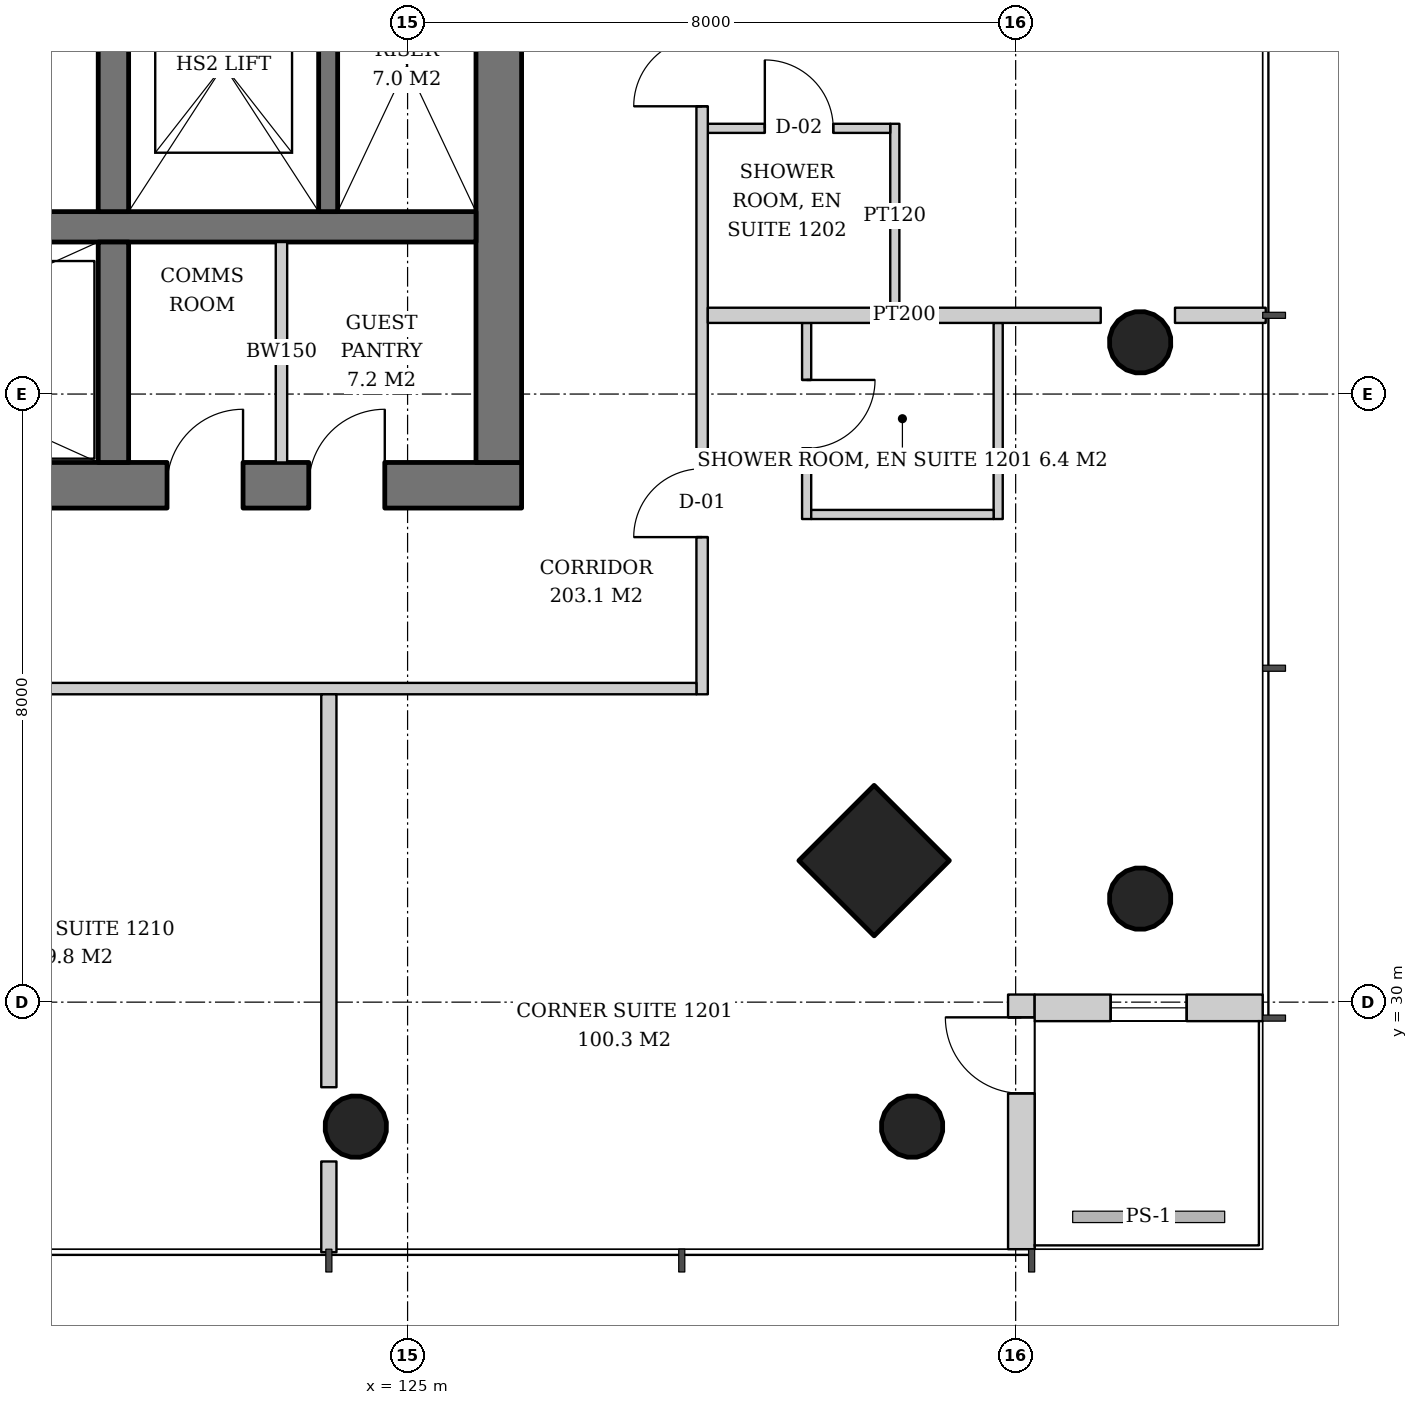
"""IFC4 building model, lengths in metres.
Left out: names, types, materials, properties, quantities, classifications, styles, units other than length and angle.
Written with IfcOpenShell. Run it as: python <this file> out.ifc"""

import sys

from ifc_helpers import new_model, si_unit, direction, frame, frame_2d, origin, origin_2d, place, context, subcontext, project, spatial, rectangle, hollow_circle, extrude, element, fill, save


model = new_model("IFC4")
c1 = context("Model", 3, precision=1e-05, world=origin(), true_north=direction((0.0, 1.0)))
c2 = subcontext(c1, "Body", "Model", "MODEL_VIEW")
j1 = project(units=[si_unit("LENGTHUNIT", "METRE"), si_unit("PLANEANGLEUNIT", "RADIAN")], contexts=[c1])
p1 = place(None, origin())
s1 = spatial("IfcSite", under=j1, at=p1, CompositionType="ELEMENT")
p2 = place(p1, origin())
s2 = spatial("IfcBuilding", under=s1, at=p2, CompositionType="ELEMENT")
p3 = place(p2, frame((0.0, 0.0, 51.4)))
s3 = spatial("IfcBuildingStorey", under=s2, at=p3, CompositionType="ELEMENT", Elevation=51.4)
p4 = place(p3, frame((134.69, 31.31, 0.0), z_axis=(-0.043029647111, 0.043029647111, 0.998146732169), x_axis=(-0.707106781187, -0.707106781187, 0.0)))
e1 = element("IfcColumn", 1, at=p4, inside=s3, PredefinedType="COLUMN", context=c2, shape_type="SweptSolid", body=[
    extrude(hollow_circle(Radius=0.406, WallThickness=0.03, at=origin_2d()), origin(), (0.0, 0.0, 1.0), 3.807),
])
p5 = place(p3, frame((134.69, 38.655, 0.0), z_axis=(-0.043059584825, 0.021497706284, 0.998841188968), x_axis=(-0.446680166538, -0.894693706707, 0.0)))
e2 = element("IfcColumn", 2, at=p5, inside=s3, PredefinedType="COLUMN", context=c2, shape_type="SweptSolid", body=[
    extrude(hollow_circle(Radius=0.406, WallThickness=0.03, at=origin_2d()), origin(), (0.0, 0.0, 1.0), 3.804),
])
p6 = place(p3, frame((131.19, 31.81, 0.0), z_axis=(-0.043029647111, 0.043029647111, 0.998146732169), x_axis=(-0.707106781187, -0.707106781187, 0.0)))
e3 = element("IfcColumn", 3, at=p6, inside=s3, PredefinedType="COLUMN", context=c2, shape_type="SweptSolid", body=[
    extrude(rectangle(XDim=1.4, YDim=1.4, at=origin_2d()), origin(), (0.0, 0.0, 1.0), 3.807),
])
p7 = place(p3, frame((131.69, 28.31, 0.0), z_axis=(-0.043029647111, 0.043029647111, 0.998146732169), x_axis=(-0.707106781187, -0.707106781187, 0.0)))
e4 = element("IfcColumn", 4, at=p7, inside=s3, PredefinedType="COLUMN", context=c2, shape_type="SweptSolid", body=[
    extrude(hollow_circle(Radius=0.406, WallThickness=0.03, at=origin_2d()), origin(), (0.0, 0.0, 1.0), 3.807),
])
p8 = place(p3, frame((124.345, 28.31, 0.0), z_axis=(-0.021497706284, 0.043059584825, 0.998841188968), x_axis=(-0.894693706707, -0.446680166538, 0.0)))
e5 = element("IfcColumn", 5, at=p8, inside=s3, PredefinedType="COLUMN", context=c2, shape_type="SweptSolid", body=[
    extrude(hollow_circle(Radius=0.406, WallThickness=0.03, at=origin_2d()), origin(), (0.0, 0.0, 1.0), 3.804),
])
p9 = place(p3, frame((107.5, 36.8, 0.0), z_axis=(0.0, 0.0, 1.0), x_axis=(1.0, 0.0, 0.0)))
e6 = element("IfcWall", 6, at=p9, inside=s3, PredefinedType="SHEAR", context=c2, shape_type="SweptSolid", body=[
    extrude(rectangle(XDim=19.0, YDim=0.6, at=frame_2d((9.5, 0.0))), origin(), (0.0, 0.0, 1.0), 3.8),
])
p10 = place(p9, frame((3.9, 0.0, 0.0)))
e7 = element("IfcOpeningElement", 7, at=p10, cuts=e6, PredefinedType="OPENING", context=c2, shape_type="SweptSolid", body=[
    extrude(rectangle(XDim=1.0, YDim=2.1, at=frame_2d((0.5, 1.05))), frame((0.0, 0.31, 0.0), z_axis=(0.0, -1.0, 0.0), x_axis=(1.0, 0.0, 0.0)), (0.0, 0.0, 1.0), 0.62),
])
p11 = place(p9, frame((14.335, 0.0, 0.0)))
e8 = element("IfcOpeningElement", 8, at=p11, cuts=e6, PredefinedType="OPENING", context=c2, shape_type="SweptSolid", body=[
    extrude(rectangle(XDim=1.0, YDim=2.1, at=frame_2d((0.5, 1.05))), frame((0.0, 0.31, 0.0), z_axis=(0.0, -1.0, 0.0), x_axis=(1.0, 0.0, 0.0)), (0.0, 0.0, 1.0), 0.62),
])
p12 = place(p9, frame((16.2, 0.0, 0.0)))
e9 = element("IfcOpeningElement", 9, at=p12, cuts=e6, PredefinedType="OPENING", context=c2, shape_type="SweptSolid", body=[
    extrude(rectangle(XDim=1.0, YDim=2.1, at=frame_2d((0.5, 1.05))), frame((0.0, 0.31, 0.0), z_axis=(0.0, -1.0, 0.0), x_axis=(1.0, 0.0, 0.0)), (0.0, 0.0, 1.0), 0.62),
])
p13 = place(p3, frame((126.2, 37.1, 0.0), z_axis=(0.0, 0.0, 1.0), x_axis=(0.0, 1.0, 0.0)))
e10 = element("IfcWall", 10, at=p13, inside=s3, PredefinedType="SHEAR", context=c2, shape_type="SweptSolid", body=[
    extrude(rectangle(XDim=17.8, YDim=0.6, at=frame_2d((8.9, 0.0))), origin(), (0.0, 0.0, 1.0), 3.8),
])
p14 = place(p13, frame((8.0, 0.0, 0.0)))
e11 = element("IfcOpeningElement", 11, at=p14, cuts=e10, PredefinedType="OPENING", context=c2, shape_type="SweptSolid", body=[
    extrude(rectangle(XDim=1.8, YDim=2.4, at=frame_2d((0.9, 1.2))), frame((0.0, 0.31, 0.0), z_axis=(0.0, -1.0, 0.0), x_axis=(1.0, 0.0, 0.0)), (0.0, 0.0, 1.0), 0.62),
])
p15 = place(p3, frame((108.1, 40.2, 0.0), z_axis=(0.0, 0.0, 1.0), x_axis=(1.0, 0.0, 0.0)))
e12 = element("IfcWall", 12, at=p15, inside=s3, PredefinedType="SHEAR", context=c2, shape_type="SweptSolid", body=[
    extrude(rectangle(XDim=17.8, YDim=0.4, at=frame_2d((8.9, 0.0))), origin(), (0.0, 0.0, 1.0), 3.8),
])
p16 = place(p3, frame((121.13, 37.1, 0.0), z_axis=(0.0, 0.0, 1.0), x_axis=(0.0, 1.0, 0.0)))
e13 = element("IfcWall", 13, at=p16, inside=s3, PredefinedType="SHEAR", context=c2, shape_type="SweptSolid", body=[
    extrude(rectangle(XDim=2.9, YDim=0.4, at=frame_2d((1.45, 0.0))), origin(), (0.0, 0.0, 1.0), 3.8),
])
p17 = place(p3, frame((121.13, 40.4, 0.0), z_axis=(0.0, 0.0, 1.0), x_axis=(0.0, 1.0, 0.0)))
e14 = element("IfcWall", 14, at=p17, inside=s3, PredefinedType="SHEAR", context=c2, shape_type="SweptSolid", body=[
    extrude(rectangle(XDim=11.2, YDim=0.4, at=frame_2d((5.6, 0.0))), origin(), (0.0, 0.0, 1.0), 3.8),
])
p18 = place(p3, frame((133.075, 26.75, 0.0), z_axis=(0.0, 0.0, 1.0), x_axis=(0.0, 1.0, 0.0)))
e15 = element("IfcWall", 15, at=p18, inside=s3, PredefinedType="SOLIDWALL", context=c2, shape_type="SweptSolid", body=[
    extrude(rectangle(XDim=3.35, YDim=0.35, at=frame_2d((1.675, 0.0))), origin(), (0.0, 0.0, 1.0), 3.6),
])
p19 = place(p18, frame((2.05, 0.0, 0.0)))
e16 = element("IfcOpeningElement", 16, at=p19, cuts=e15, PredefinedType="OPENING", context=c2, shape_type="SweptSolid", body=[
    extrude(rectangle(XDim=1.0, YDim=2.4, at=frame_2d((0.5, 1.2))), frame((0.0, 0.185, 0.0), z_axis=(0.0, -1.0, 0.0), x_axis=(1.0, 0.0, 0.0)), (0.0, 0.0, 1.0), 0.37),
])
p20 = place(p3, frame((133.25, 29.925, 0.0), z_axis=(0.0, 0.0, 1.0), x_axis=(1.0, 0.0, 0.0)))
e17 = element("IfcWall", 17, at=p20, inside=s3, PredefinedType="SOLIDWALL", context=c2, shape_type="SweptSolid", body=[
    extrude(rectangle(XDim=3.0, YDim=0.35, at=frame_2d((1.5, 0.0))), origin(), (0.0, 0.0, 1.0), 3.6),
])
p21 = place(p20, frame((1.0, 0.0, 0.9)))
e18 = element("IfcOpeningElement", 18, at=p21, cuts=e17, PredefinedType="OPENING", context=c2, shape_type="SweptSolid", body=[
    extrude(rectangle(XDim=1.0, YDim=2.4, at=frame_2d((0.5, 1.2))), frame((0.0, 0.185, 0.0), z_axis=(0.0, -1.0, 0.0), x_axis=(1.0, 0.0, 0.0)), (0.0, 0.0, 1.0), 0.37),
])
p22 = place(p3, frame((123.955, 44.25, 0.0), z_axis=(0.0, 0.0, 1.0), x_axis=(0.0, -1.0, 0.0)))
e19 = element("IfcWall", 19, at=p22, inside=s3, PredefinedType="SHEAR", context=c2, shape_type="SweptSolid", body=[
    extrude(rectangle(XDim=3.85, YDim=0.25, at=frame_2d((1.925, 0.0))), origin(), (0.0, 0.0, 1.0), 3.8),
])
p23 = place(p3, frame((123.341, 37.1, 0.0), z_axis=(0.0, 0.0, 1.0), x_axis=(0.0, 1.0, 0.0)))
e20 = element("IfcWall", 20, at=p23, inside=s3, PredefinedType="SOLIDWALL", context=c2, shape_type="SweptSolid", body=[
    extrude(rectangle(XDim=2.9, YDim=0.15, at=frame_2d((1.45, 0.0))), origin(), (0.0, 0.0, 1.0), 3.6),
])
p24 = place(p3, frame((130.25, 38.936, 0.0), z_axis=(0.0, 0.0, 1.0), x_axis=(0.0, -1.0, 0.0)))
e21 = element("IfcWall", 21, at=p24, inside=s3, PredefinedType="PARTITIONING", context=c2, shape_type="SweptSolid", body=[
    extrude(rectangle(XDim=2.58, YDim=0.12, at=frame_2d((1.29, 0.0))), origin(), (0.0, 0.0, 1.0), 2.8),
])
p25 = place(p24, frame((0.75, 0.0, 0.0)))
e22 = element("IfcOpeningElement", 22, at=p25, cuts=e21, PredefinedType="OPENING", context=c2, shape_type="SweptSolid", body=[
    extrude(rectangle(XDim=0.9, YDim=2.1, at=frame_2d((0.45, 1.05))), frame((0.0, 0.07, 0.0), z_axis=(0.0, -1.0, 0.0), x_axis=(1.0, 0.0, 0.0)), (0.0, 0.0, 1.0), 0.14),
])
p26 = place(p3, frame((132.77, 38.936, 0.0), z_axis=(0.0, 0.0, 1.0), x_axis=(0.0, -1.0, 0.0)))
e23 = element("IfcWall", 23, at=p26, inside=s3, PredefinedType="PARTITIONING", context=c2, shape_type="SweptSolid", body=[
    extrude(rectangle(XDim=2.58, YDim=0.12, at=frame_2d((1.29, 0.0))), origin(), (0.0, 0.0, 1.0), 2.8),
])
p27 = place(p3, frame((130.31, 36.416, 0.0), z_axis=(0.0, 0.0, 1.0), x_axis=(1.0, 0.0, 0.0)))
e24 = element("IfcWall", 24, at=p27, inside=s3, PredefinedType="PARTITIONING", context=c2, shape_type="SweptSolid", body=[
    extrude(rectangle(XDim=2.4, YDim=0.12, at=frame_2d((1.2, 0.0))), origin(), (0.0, 0.0, 1.0), 3.6),
])
p28 = place(p3, frame((131.41, 39.136, 0.0), z_axis=(0.0, 0.0, 1.0), x_axis=(0.0, 1.0, 0.0)))
e25 = element("IfcWall", 25, at=p28, inside=s3, PredefinedType="PARTITIONING", context=c2, shape_type="SweptSolid", body=[
    extrude(rectangle(XDim=2.42, YDim=0.12, at=frame_2d((1.21, 0.0))), origin(), (0.0, 0.0, 1.0), 2.847),
])
p29 = place(p3, frame((128.95, 41.496, 0.0), z_axis=(0.0, 0.0, 1.0), x_axis=(1.0, 0.0, 0.0)))
e26 = element("IfcWall", 26, at=p29, inside=s3, PredefinedType="PARTITIONING", context=c2, shape_type="SweptSolid", body=[
    extrude(rectangle(XDim=2.4, YDim=0.12, at=frame_2d((1.2, 0.0))), origin(), (0.0, 0.0, 1.0), 3.6),
])
p30 = place(p29, frame((0.75, 0.0, 0.0)))
e27 = element("IfcOpeningElement", 27, at=p30, cuts=e26, PredefinedType="OPENING", context=c2, shape_type="SweptSolid", body=[
    extrude(rectangle(XDim=0.9, YDim=2.1, at=frame_2d((0.45, 1.05))), frame((0.0, 0.07, 0.0), z_axis=(0.0, -1.0, 0.0), x_axis=(1.0, 0.0, 0.0)), (0.0, 0.0, 1.0), 0.14),
])
p31 = place(p3, frame((128.875, 34.05, 0.0), z_axis=(0.0, 0.0, 1.0), x_axis=(0.0, 1.0, 0.0)))
e28 = element("IfcWall", 28, at=p31, inside=s3, PredefinedType="PARTITIONING", context=c2, shape_type="SweptSolid", body=[
    extrude(rectangle(XDim=23.75, YDim=0.15, at=frame_2d((11.875, 0.0))), origin(), (0.0, 0.0, 1.0), 2.8),
])
p32 = place(p31, frame((2.068, 0.0, 0.0)))
e29 = element("IfcOpeningElement", 29, at=p32, cuts=e28, PredefinedType="OPENING", context=c2, shape_type="SweptSolid", body=[
    extrude(rectangle(XDim=0.9, YDim=2.1, at=frame_2d((0.45, 1.05))), frame((0.0, 0.085, 0.0), z_axis=(0.0, -1.0, 0.0), x_axis=(1.0, 0.0, 0.0)), (0.0, 0.0, 1.0), 0.17),
])
p33 = place(p31, frame((7.736, 0.0, 0.0)))
e30 = element("IfcOpeningElement", 30, at=p33, cuts=e28, PredefinedType="OPENING", context=c2, shape_type="SweptSolid", body=[
    extrude(rectangle(XDim=0.9, YDim=2.1, at=frame_2d((0.45, 1.05))), frame((0.0, 0.085, 0.0), z_axis=(0.0, -1.0, 0.0), x_axis=(1.0, 0.0, 0.0)), (0.0, 0.0, 1.0), 0.17),
])
p34 = place(p31, frame((15.014, 0.0, 0.0)))
e31 = element("IfcOpeningElement", 31, at=p34, cuts=e28, PredefinedType="OPENING", context=c2, shape_type="SweptSolid", body=[
    extrude(rectangle(XDim=0.9, YDim=2.1, at=frame_2d((0.45, 1.05))), frame((0.0, 0.085, 0.0), z_axis=(0.0, -1.0, 0.0), x_axis=(1.0, 0.0, 0.0)), (0.0, 0.0, 1.0), 0.17),
])
p35 = place(p3, frame((128.95, 39.036, 0.0), z_axis=(0.0, 0.0, 1.0), x_axis=(1.0, 0.0, 0.0)))
e32 = element("IfcWall", 32, at=p35, inside=s3, PredefinedType="PARTITIONING", context=c2, shape_type="SweptSolid", body=[
    extrude(rectangle(XDim=5.169, YDim=0.2, at=frame_2d((2.585, 0.0))), origin(), (0.0, 0.0, 1.0), 3.6),
])
p36 = place(p3, frame((135.096, 39.036, 0.0), z_axis=(0.0, 0.0, 1.0), x_axis=(1.0, 0.0, 0.0)))
e33 = element("IfcWall", 33, at=p36, inside=s3, PredefinedType="PARTITIONING", context=c2, shape_type="SweptSolid", body=[
    extrude(rectangle(XDim=1.194, YDim=0.2, at=frame_2d((0.597, 0.0))), origin(), (0.0, 0.0, 1.0), 3.6),
])
p37 = place(p3, frame((105.05, 34.125, 0.0), z_axis=(0.0, 0.0, 1.0), x_axis=(1.0, 0.0, 0.0)))
e34 = element("IfcWall", 34, at=p37, inside=s3, PredefinedType="PARTITIONING", context=c2, shape_type="SweptSolid", body=[
    extrude(rectangle(XDim=23.75, YDim=0.15, at=frame_2d((11.875, 0.0))), origin(), (0.0, 0.0, 1.0), 2.8),
])
p38 = place(p37, frame((2.068, 0.0, 0.0)))
e35 = element("IfcOpeningElement", 35, at=p38, cuts=e34, PredefinedType="OPENING", context=c2, shape_type="SweptSolid", body=[
    extrude(rectangle(XDim=0.9, YDim=2.1, at=frame_2d((0.45, 1.05))), frame((0.0, 0.085, 0.0), z_axis=(0.0, -1.0, 0.0), x_axis=(1.0, 0.0, 0.0)), (0.0, 0.0, 1.0), 0.17),
])
p39 = place(p37, frame((12.379, 0.0, 0.0)))
e36 = element("IfcOpeningElement", 36, at=p39, cuts=e34, PredefinedType="OPENING", context=c2, shape_type="SweptSolid", body=[
    extrude(rectangle(XDim=0.9, YDim=2.1, at=frame_2d((0.45, 1.05))), frame((0.0, 0.085, 0.0), z_axis=(0.0, -1.0, 0.0), x_axis=(1.0, 0.0, 0.0)), (0.0, 0.0, 1.0), 0.17),
])
p40 = place(p3, frame((123.964, 34.05, 0.0), z_axis=(0.0, 0.0, 1.0), x_axis=(0.0, -1.0, 0.0)))
e37 = element("IfcWall", 37, at=p40, inside=s3, PredefinedType="PARTITIONING", context=c2, shape_type="SweptSolid", body=[
    extrude(rectangle(XDim=5.169, YDim=0.2, at=frame_2d((2.585, 0.0))), origin(), (0.0, 0.0, 1.0), 3.6),
])
p41 = place(p3, frame((123.964, 27.904, 0.0), z_axis=(0.0, 0.0, 1.0), x_axis=(0.0, -1.0, 0.0)))
e38 = element("IfcWall", 38, at=p41, inside=s3, PredefinedType="PARTITIONING", context=c2, shape_type="SweptSolid", body=[
    extrude(rectangle(XDim=1.194, YDim=0.2, at=frame_2d((0.597, 0.0))), origin(), (0.0, 0.0, 1.0), 3.6),
])
p42 = place(p19, origin())
e39 = element("IfcDoor", 39, at=p42, inside=s3, OperationType="SINGLE_SWING_RIGHT", PredefinedType="DOOR", context=c2, shape_type="SweptSolid", body=[
    extrude(rectangle(XDim=1.0, YDim=2.4, at=frame_2d((0.5, 1.2))), frame((0.0, 0.025, 0.0), z_axis=(0.0, -1.0, 0.0), x_axis=(1.0, 0.0, 0.0)), (0.0, 0.0, 1.0), 0.05),
])
fill(e16, e39)
p43 = place(p21, origin())
e40 = element("IfcWindow", 40, at=p43, inside=s3, PartitioningType="SINGLE_PANEL", PredefinedType="WINDOW", context=c2, shape_type="SweptSolid", body=[
    extrude(rectangle(XDim=1.0, YDim=2.4, at=frame_2d((0.5, 1.2))), frame((0.0, 0.03, 0.0), z_axis=(0.0, -1.0, 0.0), x_axis=(1.0, 0.0, 0.0)), (0.0, 0.0, 1.0), 0.06),
])
fill(e18, e40)
p44 = place(p11, origin())
e41 = element("IfcDoor", 41, at=p44, inside=s3, OperationType="SINGLE_SWING_RIGHT", PredefinedType="DOOR", context=c2, shape_type="SweptSolid", body=[
    extrude(rectangle(XDim=1.0, YDim=2.1, at=frame_2d((0.5, 1.05))), frame((0.0, 0.29, 0.0), z_axis=(0.0, -1.0, 0.0), x_axis=(1.0, 0.0, 0.0)), (0.0, 0.0, 1.0), 0.05),
])
fill(e8, e41)
p45 = place(p12, origin())
e42 = element("IfcDoor", 42, at=p45, inside=s3, OperationType="SINGLE_SWING_RIGHT", PredefinedType="DOOR", context=c2, shape_type="SweptSolid", body=[
    extrude(rectangle(XDim=1.0, YDim=2.1, at=frame_2d((0.5, 1.05))), frame((0.0, 0.29, 0.0), z_axis=(0.0, -1.0, 0.0), x_axis=(1.0, 0.0, 0.0)), (0.0, 0.0, 1.0), 0.05),
])
fill(e9, e42)
p46 = place(p25, origin())
e43 = element("IfcDoor", 43, at=p46, inside=s3, OperationType="SINGLE_SWING_LEFT", PredefinedType="DOOR", context=c2, shape_type="SweptSolid", body=[
    extrude(rectangle(XDim=0.9, YDim=2.1, at=frame_2d((0.45, 1.05))), frame((0.0, 0.025, 0.0), z_axis=(0.0, -1.0, 0.0), x_axis=(1.0, 0.0, 0.0)), (0.0, 0.0, 1.0), 0.05),
])
fill(e22, e43)
p47 = place(p30, origin())
e44 = element("IfcDoor", 44, at=p47, inside=s3, OperationType="SINGLE_SWING_LEFT", PredefinedType="DOOR", context=c2, shape_type="SweptSolid", body=[
    extrude(rectangle(XDim=0.9, YDim=2.1, at=frame_2d((0.45, 1.05))), frame((0.0, 0.025, 0.0), z_axis=(0.0, -1.0, 0.0), x_axis=(1.0, 0.0, 0.0)), (0.0, 0.0, 1.0), 0.05),
])
fill(e27, e44)
p48 = place(p32, origin())
e45 = element("IfcDoor", 45, at=p48, inside=s3, OperationType="SINGLE_SWING_LEFT", PredefinedType="DOOR", context=c2, shape_type="SweptSolid", body=[
    extrude(rectangle(XDim=0.9, YDim=2.1, at=frame_2d((0.45, 1.05))), frame((0.0, 0.025, 0.0), z_axis=(0.0, -1.0, 0.0), x_axis=(1.0, 0.0, 0.0)), (0.0, 0.0, 1.0), 0.05),
])
fill(e29, e45)
p49 = place(p33, origin())
e46 = element("IfcDoor", 46, at=p49, inside=s3, OperationType="SINGLE_SWING_LEFT", PredefinedType="DOOR", context=c2, shape_type="SweptSolid", body=[
    extrude(rectangle(XDim=0.9, YDim=2.1, at=frame_2d((0.45, 1.05))), frame((0.0, 0.025, 0.0), z_axis=(0.0, -1.0, 0.0), x_axis=(1.0, 0.0, 0.0)), (0.0, 0.0, 1.0), 0.05),
])
fill(e30, e46)
save(model, sys.argv[1])
